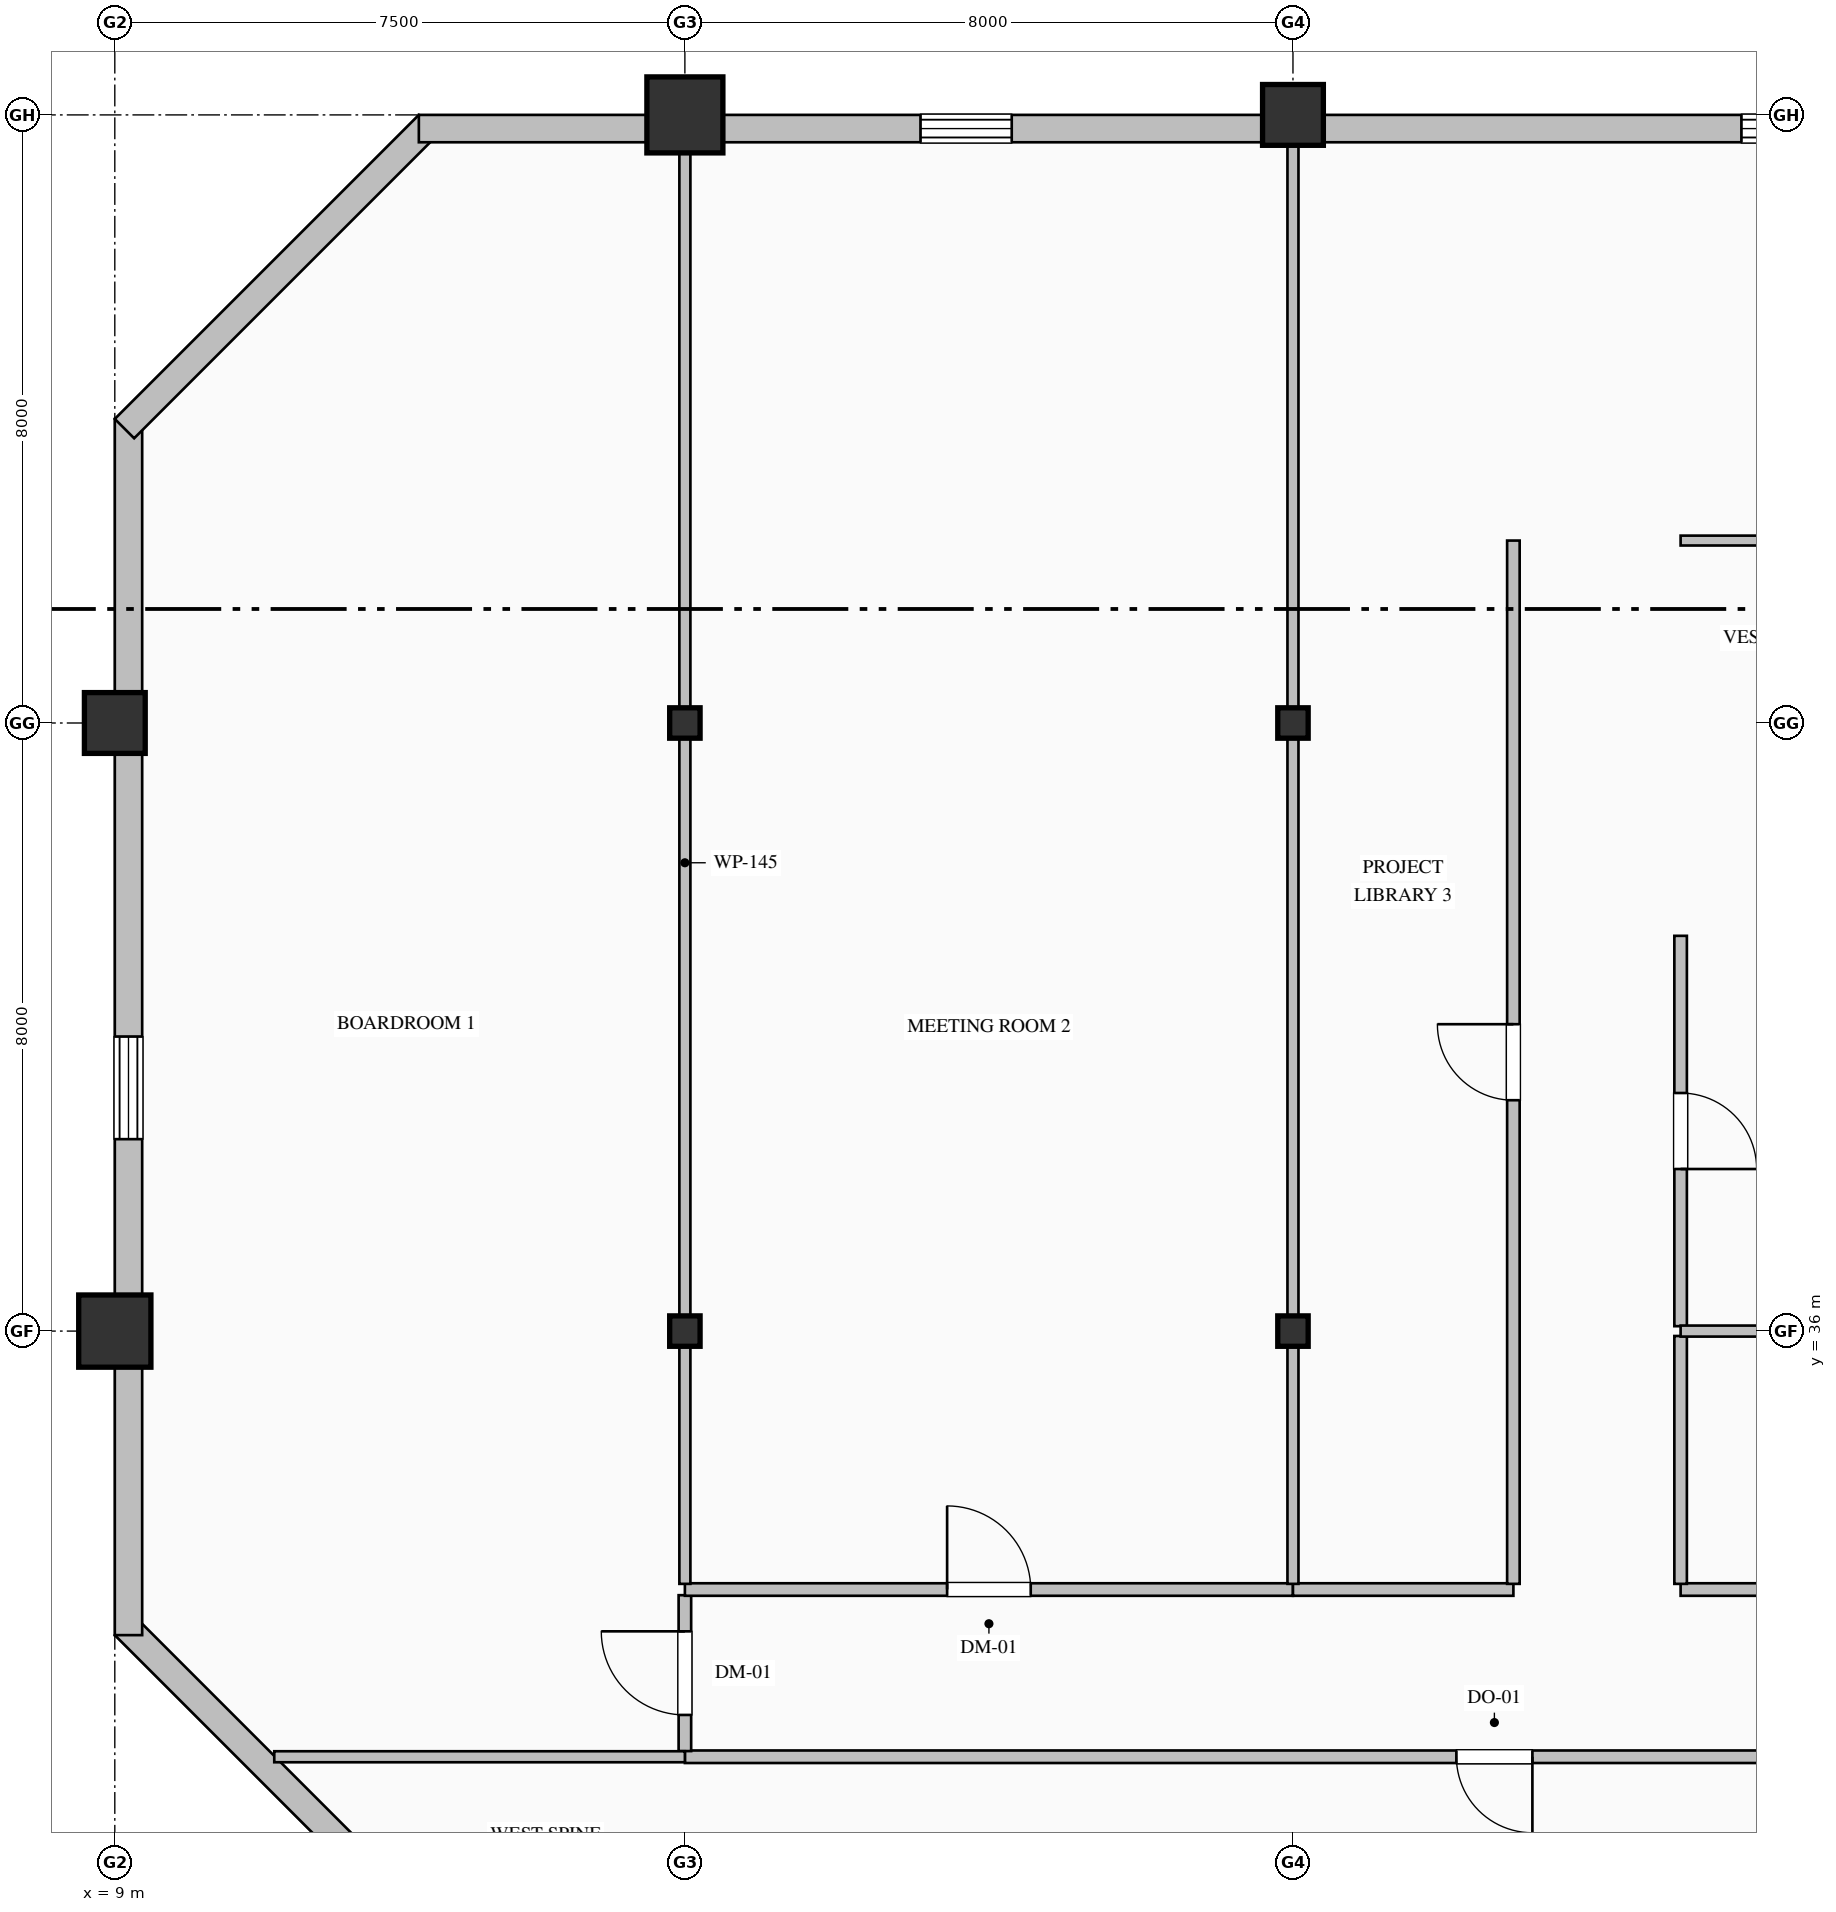
"""IFC4 building model, lengths in metres.
Left out: names, types, materials, properties, quantities, classifications, styles, units other than length and angle.
Written with IfcOpenShell. Run it as: python <this file> out.ifc"""

import sys

from ifc_helpers import new_model, si_unit, direction, frame, frame_2d, origin, origin_2d, place, context, subcontext, project, spatial, rectangle, hollow_rectangle, hollow_circle, i_section, extrude, element, fill, save


model = new_model("IFC4")
c1 = context("Model", 3, precision=1e-05, world=origin(), true_north=direction((0.0, 1.0)))
c2 = subcontext(c1, "Body", "Model", "MODEL_VIEW")
j1 = project(units=[si_unit("LENGTHUNIT", "METRE"), si_unit("PLANEANGLEUNIT", "RADIAN")], contexts=[c1])
p1 = place(None, origin())
s1 = spatial("IfcSite", under=j1, at=p1, CompositionType="ELEMENT")
p2 = place(p1, origin())
s2 = spatial("IfcBuilding", under=s1, at=p2, CompositionType="ELEMENT")
p3 = place(p2, frame((0.0, 0.0, 225.8)))
s3 = spatial("IfcBuildingStorey", under=s2, at=p3, CompositionType="ELEMENT", Elevation=225.8)
p4 = place(p3, frame((9.0, 36.0, 0.0), z_axis=(0.0, 0.0, 1.0), x_axis=(1.0, 0.0, 0.0)))
e1 = element("IfcColumn", 1, at=p4, inside=s3, PredefinedType="COLUMN", context=c2, shape_type="SweptSolid", body=[
    extrude(hollow_rectangle(XDim=0.95, YDim=0.95, WallThickness=0.036, at=origin_2d()), origin(), (0.0, 0.0, 1.0), 4.0),
])
p5 = place(p3, frame((9.0, 44.0, 0.0), z_axis=(0.0, 0.0, 1.0), x_axis=(1.0, 0.0, 0.0)))
e2 = element("IfcColumn", 2, at=p5, inside=s3, PredefinedType="COLUMN", context=c2, shape_type="SweptSolid", body=[
    extrude(hollow_rectangle(XDim=0.8, YDim=0.8, WallThickness=0.032, at=origin_2d()), origin(), (0.0, 0.0, 1.0), 4.0),
])
for number, where, z_axis, x_axis in (
    (3, (16.5, 36.0, 0.0), (0.0, 0.0, 1.0), (1.0, 0.0, 0.0)),
    (4, (16.5, 44.0, 0.0), (0.0, 0.0, 1.0), (1.0, 0.0, 0.0)),
):
    element("IfcColumn", number, at=place(p3, frame(where, z_axis=z_axis, x_axis=x_axis)), inside=s3, PredefinedType="COLUMN", context=c2, shape_type="SweptSolid", body=[
        extrude(i_section(OverallWidth=0.4, OverallDepth=0.4, WebThickness=0.013, FlangeThickness=0.021, FilletRadius=0.022, at=origin_2d()), origin(), (0.0, 0.0, 1.0), 4.0),
    ])
p6 = place(p3, frame((16.5, 52.0, 0.0), z_axis=(0.0, 0.0, 1.0), x_axis=(1.0, 0.0, 0.0)))
e5 = element("IfcColumn", 5, at=p6, inside=s3, PredefinedType="COLUMN", context=c2, shape_type="SweptSolid", body=[
    extrude(hollow_circle(Radius=0.5, WallThickness=0.036, at=origin_2d()), origin(), (0.0, 0.0, 1.0), 4.0),
])
for number, where, z_axis, x_axis in (
    (6, (24.5, 36.0, 0.0), (0.0, 0.0, 1.0), (1.0, 0.0, 0.0)),
    (7, (24.5, 44.0, 0.0), (0.0, 0.0, 1.0), (1.0, 0.0, 0.0)),
):
    element("IfcColumn", number, at=place(p3, frame(where, z_axis=z_axis, x_axis=x_axis)), inside=s3, PredefinedType="COLUMN", context=c2, shape_type="SweptSolid", body=[
        extrude(i_section(OverallWidth=0.4, OverallDepth=0.4, WebThickness=0.013, FlangeThickness=0.021, FilletRadius=0.022, at=origin_2d()), origin(), (0.0, 0.0, 1.0), 4.0),
    ])
p7 = place(p3, frame((24.5, 52.0, 0.0), z_axis=(0.0, 0.0, 1.0), x_axis=(1.0, 0.0, 0.0)))
e8 = element("IfcColumn", 8, at=p7, inside=s3, PredefinedType="COLUMN", context=c2, shape_type="SweptSolid", body=[
    extrude(hollow_rectangle(XDim=0.8, YDim=0.8, WallThickness=0.032, at=origin_2d()), origin(), (0.0, 0.0, 1.0), 4.0),
])
p8 = place(p3, frame((13.127, 28.127, 0.0), z_axis=(0.0, 0.0, 1.0), x_axis=(-0.707106781187, 0.707106781187, 0.0)))
e9 = element("IfcWall", 9, at=p8, inside=s3, PredefinedType="SOLIDWALL", context=c2, shape_type="SweptSolid", body=[
    extrude(rectangle(XDim=5.657, YDim=0.36, at=frame_2d((2.828, 0.0))), origin(), (0.0, 0.0, 1.0), 3.775),
])
p9 = place(p3, frame((9.18, 32.0, 0.0), z_axis=(0.0, 0.0, 1.0), x_axis=(0.0, 1.0, 0.0)))
e10 = element("IfcWall", 10, at=p9, inside=s3, PredefinedType="SOLIDWALL", context=c2, shape_type="SweptSolid", body=[
    extrude(rectangle(XDim=16.0, YDim=0.36, at=frame_2d((8.0, 0.0))), origin(), (0.0, 0.0, 1.0), 3.325),
])
p10 = place(p9, frame((6.525, 0.0, 0.9)))
e11 = element("IfcOpeningElement", 11, at=p10, cuts=e10, PredefinedType="OPENING", context=c2, shape_type="SweptSolid", body=[
    extrude(rectangle(XDim=1.35, YDim=1.85, at=frame_2d((0.675, 0.925))), frame((0.0, 0.19, 0.0), z_axis=(0.0, -1.0, 0.0), x_axis=(1.0, 0.0, 0.0)), (0.0, 0.0, 1.0), 0.38),
])
p11 = place(p3, frame((9.127, 47.873, 0.0), z_axis=(0.0, 0.0, 1.0), x_axis=(0.707106781187, 0.707106781187, 0.0)))
e12 = element("IfcWall", 12, at=p11, inside=s3, PredefinedType="SOLIDWALL", context=c2, shape_type="SweptSolid", body=[
    extrude(rectangle(XDim=5.657, YDim=0.36, at=frame_2d((2.828, 0.0))), origin(), (0.0, 0.0, 1.0), 3.775),
])
p12 = place(p3, frame((13.0, 51.82, 0.0), z_axis=(0.0, 0.0, 1.0), x_axis=(1.0, 0.0, 0.0)))
e13 = element("IfcWall", 13, at=p12, inside=s3, PredefinedType="SOLIDWALL", context=c2, shape_type="SweptSolid", body=[
    extrude(rectangle(XDim=27.52, YDim=0.36, at=frame_2d((13.76, 0.0))), origin(), (0.0, 0.0, 1.0), 3.325),
])
p13 = place(p12, frame((6.6, 0.0, 0.9)))
e14 = element("IfcOpeningElement", 14, at=p13, cuts=e13, PredefinedType="OPENING", context=c2, shape_type="SweptSolid", body=[
    extrude(rectangle(XDim=1.2, YDim=1.85, at=frame_2d((0.6, 0.925))), frame((0.0, 0.19, 0.0), z_axis=(0.0, -1.0, 0.0), x_axis=(1.0, 0.0, 0.0)), (0.0, 0.0, 1.0), 0.38),
])
p14 = place(p12, frame((17.4, 0.0, 0.9)))
e15 = element("IfcOpeningElement", 15, at=p14, cuts=e13, PredefinedType="OPENING", context=c2, shape_type="SweptSolid", body=[
    extrude(rectangle(XDim=1.2, YDim=1.85, at=frame_2d((0.6, 0.925))), frame((0.0, 0.19, 0.0), z_axis=(0.0, -1.0, 0.0), x_axis=(1.0, 0.0, 0.0)), (0.0, 0.0, 1.0), 0.38),
])
p15 = place(p3, frame((37.8, 30.4, 0.0), z_axis=(0.0, 0.0, 1.0), x_axis=(-1.0, 0.0, 0.0)))
e16 = element("IfcWall", 16, at=p15, inside=s3, PredefinedType="PARTITIONING", context=c2, shape_type="SweptSolid", body=[
    extrude(rectangle(XDim=21.3, YDim=0.165, at=frame_2d((10.65, 0.0))), origin(), (0.0, 0.0, 1.0), 3.775),
])
p16 = place(p15, frame((10.15, 0.0, 0.0)))
e17 = element("IfcOpeningElement", 17, at=p16, cuts=e16, PredefinedType="OPENING", context=c2, shape_type="SweptSolid", body=[
    extrude(rectangle(XDim=1.0, YDim=2.15, at=frame_2d((0.5, 1.075))), frame((0.0, 0.093, 0.0), z_axis=(0.0, -1.0, 0.0), x_axis=(1.0, 0.0, 0.0)), (0.0, 0.0, 1.0), 0.185),
])
p17 = place(p3, frame((16.5, 30.475, 0.0), z_axis=(0.0, 0.0, 1.0), x_axis=(0.0, 1.0, 0.0)))
e18 = element("IfcWall", 18, at=p17, inside=s3, PredefinedType="PARTITIONING", context=c2, shape_type="SweptSolid", body=[
    extrude(rectangle(XDim=2.051, YDim=0.165, at=frame_2d((1.025, 0.0))), origin(), (0.0, 0.0, 1.0), 3.179),
])
p18 = place(p17, frame((0.476, 0.0, 0.0)))
e19 = element("IfcOpeningElement", 19, at=p18, cuts=e18, PredefinedType="OPENING", context=c2, shape_type="SweptSolid", body=[
    extrude(rectangle(XDim=1.1, YDim=2.2, at=frame_2d((0.55, 1.1))), frame((0.0, 0.093, 0.0), z_axis=(0.0, -1.0, 0.0), x_axis=(1.0, 0.0, 0.0)), (0.0, 0.0, 1.0), 0.185),
])
p19 = place(p3, frame((16.5, 32.6, 0.0), z_axis=(0.0, 0.0, 1.0), x_axis=(1.0, 0.0, 0.0)))
e20 = element("IfcWall", 20, at=p19, inside=s3, PredefinedType="PARTITIONING", context=c2, shape_type="SweptSolid", body=[
    extrude(rectangle(XDim=8.0, YDim=0.165, at=frame_2d((4.0, 0.0))), origin(), (0.0, 0.0, 1.0), 3.775),
])
p20 = place(p19, frame((3.45, 0.0, 0.0)))
e21 = element("IfcOpeningElement", 21, at=p20, cuts=e20, PredefinedType="OPENING", context=c2, shape_type="SweptSolid", body=[
    extrude(rectangle(XDim=1.1, YDim=2.2, at=frame_2d((0.55, 1.1))), frame((0.0, 0.093, 0.0), z_axis=(0.0, -1.0, 0.0), x_axis=(1.0, 0.0, 0.0)), (0.0, 0.0, 1.0), 0.185),
])
p21 = place(p3, frame((24.5, 32.6, 0.0), z_axis=(0.0, 0.0, 1.0), x_axis=(1.0, 0.0, 0.0)))
e22 = element("IfcWall", 22, at=p21, inside=s3, PredefinedType="PARTITIONING", context=c2, shape_type="SweptSolid", body=[
    extrude(rectangle(XDim=2.9, YDim=0.165, at=frame_2d((1.45, 0.0))), origin(), (0.0, 0.0, 1.0), 3.775),
])
p22 = place(p3, frame((29.6, 32.6, 0.0), z_axis=(0.0, 0.0, 1.0), x_axis=(1.0, 0.0, 0.0)))
e23 = element("IfcWall", 23, at=p22, inside=s3, PredefinedType="PARTITIONING", context=c2, shape_type="SweptSolid", body=[
    extrude(rectangle(XDim=8.2, YDim=0.165, at=frame_2d((4.1, 0.0))), origin(), (0.0, 0.0, 1.0), 3.775),
])
p23 = place(p22, frame((3.6, 0.0, 0.0)))
e24 = element("IfcOpeningElement", 24, at=p23, cuts=e23, PredefinedType="OPENING", context=c2, shape_type="SweptSolid", body=[
    extrude(rectangle(XDim=1.0, YDim=2.15, at=frame_2d((0.5, 1.075))), frame((0.0, 0.093, 0.0), z_axis=(0.0, -1.0, 0.0), x_axis=(1.0, 0.0, 0.0)), (0.0, 0.0, 1.0), 0.185),
])
p24 = place(p3, frame((27.4, 32.675, 0.0), z_axis=(0.0, 0.0, 1.0), x_axis=(0.0, 1.0, 0.0)))
e25 = element("IfcWall", 25, at=p24, inside=s3, PredefinedType="PARTITIONING", context=c2, shape_type="SweptSolid", body=[
    extrude(rectangle(XDim=13.725, YDim=0.165, at=frame_2d((6.863, 0.0))), origin(), (0.0, 0.0, 1.0), 3.775),
])
p25 = place(p24, frame((6.363, 0.0, 0.0)))
e26 = element("IfcOpeningElement", 26, at=p25, cuts=e25, PredefinedType="OPENING", context=c2, shape_type="SweptSolid", body=[
    extrude(rectangle(XDim=1.0, YDim=2.15, at=frame_2d((0.5, 1.075))), frame((0.0, 0.093, 0.0), z_axis=(0.0, -1.0, 0.0), x_axis=(1.0, 0.0, 0.0)), (0.0, 0.0, 1.0), 0.185),
])
p26 = place(p3, frame((29.6, 35.936, 0.0), z_axis=(0.0, 0.0, 1.0), x_axis=(0.0, -1.0, 0.0)))
e27 = element("IfcWall", 27, at=p26, inside=s3, PredefinedType="PARTITIONING", context=c2, shape_type="SweptSolid", body=[
    extrude(rectangle(XDim=3.261, YDim=0.165, at=frame_2d((1.63, 0.0))), origin(), (0.0, 0.0, 1.0), 3.775),
])
p27 = place(p3, frame((29.6, 41.2, 0.0), z_axis=(0.0, 0.0, 1.0), x_axis=(0.0, -1.0, 0.0)))
e28 = element("IfcWall", 28, at=p27, inside=s3, PredefinedType="PARTITIONING", context=c2, shape_type="SweptSolid", body=[
    extrude(rectangle(XDim=5.135, YDim=0.165, at=frame_2d((2.568, 0.0))), origin(), (0.0, 0.0, 1.0), 3.775),
])
p28 = place(p27, frame((2.068, 0.0, 0.0)))
e29 = element("IfcOpeningElement", 29, at=p28, cuts=e28, PredefinedType="OPENING", context=c2, shape_type="SweptSolid", body=[
    extrude(rectangle(XDim=1.0, YDim=2.15, at=frame_2d((0.5, 1.075))), frame((0.0, 0.093, 0.0), z_axis=(0.0, -1.0, 0.0), x_axis=(1.0, 0.0, 0.0)), (0.0, 0.0, 1.0), 0.185),
])
p29 = place(p3, frame((29.6, 46.4, 0.0), z_axis=(0.0, 0.0, 1.0), x_axis=(1.0, 0.0, 0.0)))
e30 = element("IfcWall", 30, at=p29, inside=s3, PredefinedType="PARTITIONING", context=c2, shape_type="SweptSolid", body=[
    extrude(rectangle(XDim=8.2, YDim=0.13, at=frame_2d((4.1, 0.0))), origin(), (0.0, 0.0, 1.0), 3.775),
])
p30 = place(p29, frame((3.6, 0.0, 0.0)))
e31 = element("IfcOpeningElement", 31, at=p30, cuts=e30, PredefinedType="OPENING", context=c2, shape_type="SweptSolid", body=[
    extrude(rectangle(XDim=1.0, YDim=2.15, at=frame_2d((0.5, 1.075))), frame((0.0, 0.075, 0.0), z_axis=(0.0, -1.0, 0.0), x_axis=(1.0, 0.0, 0.0)), (0.0, 0.0, 1.0), 0.15),
])
p31 = place(p3, frame((11.098, 30.4, 0.0), z_axis=(0.0, 0.0, 1.0), x_axis=(1.0, 0.0, 0.0)))
e32 = element("IfcWall", 32, at=p31, inside=s3, PredefinedType="PARTITIONING", context=c2, shape_type="SweptSolid", body=[
    extrude(rectangle(XDim=5.402, YDim=0.145, at=frame_2d((2.701, 0.0))), origin(), (0.0, 0.0, 1.0), 3.775),
])
for number, where, z_axis, x_axis in (
    (33, (16.5, 51.648, 0.0), (0.0, 0.0, 1.0), (0.0, -1.0, 0.0)),
    (34, (24.5, 51.648, 0.0), (0.0, 0.0, 1.0), (0.0, -1.0, 0.0)),
):
    element("IfcWall", number, at=place(p3, frame(where, z_axis=z_axis, x_axis=x_axis)), inside=s3, PredefinedType="PARTITIONING", context=c2, shape_type="SweptSolid", body=[
        extrude(rectangle(XDim=18.973, YDim=0.145, at=frame_2d((9.487, 0.0))), origin(), (0.0, 0.0, 1.0), 3.179),
    ])
p32 = place(p3, frame((29.6, 36.0, 0.0), z_axis=(0.0, 0.0, 1.0), x_axis=(1.0, 0.0, 0.0)))
e35 = element("IfcWall", 35, at=p32, inside=s3, PredefinedType="PARTITIONING", context=c2, shape_type="SweptSolid", body=[
    extrude(rectangle(XDim=8.2, YDim=0.145, at=frame_2d((4.1, 0.0))), origin(), (0.0, 0.0, 1.0), 3.179),
])
p33 = place(p10, origin())
e36 = element("IfcWindow", 36, at=p33, inside=s3, PartitioningType="DOUBLE_PANEL_VERTICAL", PredefinedType="WINDOW", context=c2, shape_type="SweptSolid", body=[
    extrude(rectangle(XDim=1.35, YDim=1.85, at=frame_2d((0.675, 0.925))), frame((0.0, 0.15, 0.0), z_axis=(0.0, -1.0, 0.0), x_axis=(1.0, 0.0, 0.0)), (0.0, 0.0, 1.0), 0.06),
])
fill(e11, e36)
p34 = place(p13, origin())
e37 = element("IfcWindow", 37, at=p34, inside=s3, PartitioningType="DOUBLE_PANEL_VERTICAL", PredefinedType="WINDOW", context=c2, shape_type="SweptSolid", body=[
    extrude(rectangle(XDim=1.2, YDim=1.85, at=frame_2d((0.6, 0.925))), frame((0.0, 0.15, 0.0), z_axis=(0.0, -1.0, 0.0), x_axis=(1.0, 0.0, 0.0)), (0.0, 0.0, 1.0), 0.06),
])
fill(e14, e37)
p35 = place(p14, origin())
e38 = element("IfcWindow", 38, at=p35, inside=s3, PartitioningType="DOUBLE_PANEL_VERTICAL", PredefinedType="WINDOW", context=c2, shape_type="SweptSolid", body=[
    extrude(rectangle(XDim=1.2, YDim=1.85, at=frame_2d((0.6, 0.925))), frame((0.0, 0.15, 0.0), z_axis=(0.0, -1.0, 0.0), x_axis=(1.0, 0.0, 0.0)), (0.0, 0.0, 1.0), 0.06),
])
fill(e15, e38)
p36 = place(p16, origin())
e39 = element("IfcDoor", 39, at=p36, inside=s3, OperationType="SINGLE_SWING_LEFT", PredefinedType="DOOR", context=c2, shape_type="SweptSolid", body=[
    extrude(rectangle(XDim=1.0, YDim=2.15, at=frame_2d((0.5, 1.075))), frame((0.0, 0.025, 0.0), z_axis=(0.0, -1.0, 0.0), x_axis=(1.0, 0.0, 0.0)), (0.0, 0.0, 1.0), 0.05),
])
fill(e17, e39)
p37 = place(p18, origin())
e40 = element("IfcDoor", 40, at=p37, inside=s3, OperationType="SINGLE_SWING_RIGHT", PredefinedType="DOOR", context=c2, shape_type="SweptSolid", body=[
    extrude(rectangle(XDim=1.1, YDim=2.2, at=frame_2d((0.55, 1.1))), frame((0.0, 0.025, 0.0), z_axis=(0.0, -1.0, 0.0), x_axis=(1.0, 0.0, 0.0)), (0.0, 0.0, 1.0), 0.05),
])
fill(e19, e40)
p38 = place(p20, origin())
e41 = element("IfcDoor", 41, at=p38, inside=s3, OperationType="SINGLE_SWING_LEFT", PredefinedType="DOOR", context=c2, shape_type="SweptSolid", body=[
    extrude(rectangle(XDim=1.1, YDim=2.2, at=frame_2d((0.55, 1.1))), frame((0.0, 0.025, 0.0), z_axis=(0.0, -1.0, 0.0), x_axis=(1.0, 0.0, 0.0)), (0.0, 0.0, 1.0), 0.05),
])
fill(e21, e41)
p39 = place(p25, origin())
e42 = element("IfcDoor", 42, at=p39, inside=s3, OperationType="SINGLE_SWING_RIGHT", PredefinedType="DOOR", context=c2, shape_type="SweptSolid", body=[
    extrude(rectangle(XDim=1.0, YDim=2.15, at=frame_2d((0.5, 1.075))), frame((0.0, 0.025, 0.0), z_axis=(0.0, -1.0, 0.0), x_axis=(1.0, 0.0, 0.0)), (0.0, 0.0, 1.0), 0.05),
])
fill(e26, e42)
p40 = place(p28, origin())
e43 = element("IfcDoor", 43, at=p40, inside=s3, OperationType="SINGLE_SWING_RIGHT", PredefinedType="DOOR", context=c2, shape_type="SweptSolid", body=[
    extrude(rectangle(XDim=1.0, YDim=2.15, at=frame_2d((0.5, 1.075))), frame((0.0, 0.025, 0.0), z_axis=(0.0, -1.0, 0.0), x_axis=(1.0, 0.0, 0.0)), (0.0, 0.0, 1.0), 0.05),
])
fill(e29, e43)
save(model, sys.argv[1])
